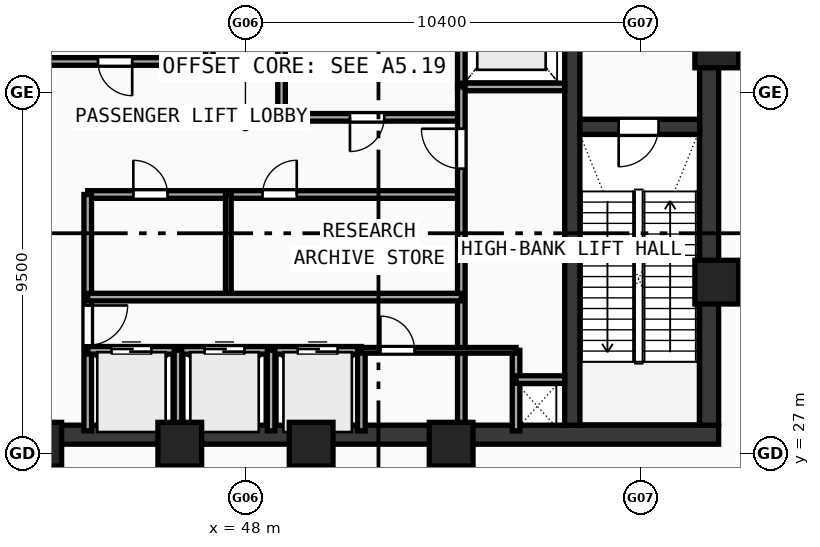
"""IFC4 building model, lengths in metres.
Left out: names, types, materials, properties, quantities, classifications, styles, units other than length and angle.
Written with IfcOpenShell. Run it as: python <this file> out.ifc"""

import sys

from ifc_helpers import new_model, si_unit, direction, frame, frame_2d, origin, origin_with_axes, origin_2d, place, context, subcontext, project, spatial, rectangle, hollow_rectangle, extrude, source, transform, mapped, element, fill, save


model = new_model("IFC4")
c1 = context("Model", 3, precision=1e-05, world=origin(), true_north=direction((0.0, 1.0)))
c2 = subcontext(c1, "Body", "Model", "MODEL_VIEW")
j1 = project(units=[si_unit("LENGTHUNIT", "METRE"), si_unit("PLANEANGLEUNIT", "RADIAN")], contexts=[c1])
p1 = place(None, origin())
s1 = spatial("IfcSite", under=j1, at=p1, CompositionType="ELEMENT")
p2 = place(p1, origin())
s2 = spatial("IfcBuilding", under=s1, at=p2, CompositionType="ELEMENT")
p3 = place(p2, frame((0.0, 0.0, 314.86)))
s3 = spatial("IfcBuildingStorey", under=s2, at=p3, CompositionType="ELEMENT", Elevation=314.86)
p4 = place(p3, frame((35.55, 27.5, 0.0), z_axis=(0.0, 0.0, 1.0), x_axis=(1.0, 0.0, 0.0)))
e1 = element("IfcWall", 1, at=p4, inside=s3, PredefinedType="SHEAR", context=c2, shape_type="SweptSolid", body=[
    extrude(rectangle(XDim=24.9, YDim=0.5, at=frame_2d((12.45, 0.0))), origin(), (0.0, 0.0, 1.0), 5.57),
])
p5 = place(p3, frame((60.2, 27.75, 0.0), z_axis=(0.0, 0.0, 1.0), x_axis=(0.0, 1.0, 0.0)))
e2 = element("IfcWall", 2, at=p5, inside=s3, PredefinedType="SHEAR", context=c2, shape_type="SweptSolid", body=[
    extrude(rectangle(XDim=12.2, YDim=0.5, at=frame_2d((6.1, 0.0))), origin(), (0.0, 0.0, 1.0), 5.57),
])
p6 = place(p3, frame((56.6, 27.75, 0.0), z_axis=(0.0, 0.0, 1.0), x_axis=(0.0, 1.0, 0.0)))
e3 = element("IfcWall", 3, at=p6, inside=s3, PredefinedType="SHEAR", context=c2, shape_type="SweptSolid", body=[
    extrude(rectangle(XDim=12.2, YDim=0.4, at=frame_2d((6.1, 0.0))), origin(), (0.0, 0.0, 1.0), 5.57),
])
p7 = place(p6, frame((10.0, 0.0, 0.0)))
e4 = element("IfcOpeningElement", 4, at=p7, cuts=e3, PredefinedType="OPENING", context=c2, shape_type="SweptSolid", body=[
    extrude(rectangle(XDim=1.1, YDim=2.1, at=frame_2d((0.55, 1.05))), frame((0.0, 0.21, 0.0), z_axis=(0.0, -1.0, 0.0), x_axis=(1.0, 0.0, 0.0)), (0.0, 0.0, 1.0), 0.42),
])
p8 = place(p3, frame((56.8, 35.6, 0.0), z_axis=(0.0, 0.0, 1.0), x_axis=(1.0, 0.0, 0.0)))
e5 = element("IfcWall", 5, at=p8, inside=s3, PredefinedType="SHEAR", context=c2, shape_type="SweptSolid", body=[
    extrude(rectangle(XDim=3.15, YDim=0.4, at=frame_2d((1.575, 0.0))), origin(), (0.0, 0.0, 1.0), 5.57),
])
p9 = place(p8, frame((1.02, 0.0, 0.0)))
e6 = element("IfcOpeningElement", 6, at=p9, cuts=e5, PredefinedType="OPENING", context=c2, shape_type="SweptSolid", body=[
    extrude(rectangle(XDim=1.05, YDim=2.1, at=frame_2d((0.525, 1.05))), frame((0.0, 0.21, 0.0), z_axis=(0.0, -1.0, 0.0), x_axis=(1.0, 0.0, 0.0)), (0.0, 0.0, 1.0), 0.42),
])
m1 = source(origin(), c2, "Body", "SweptSolid", [
    extrude(hollow_rectangle(XDim=1.15, YDim=1.15, WallThickness=0.048, at=origin_2d()), origin(), (0.0, 0.0, 1.0), 5.83),
])
for number, where, z_axis, x_axis in (
    (7, (42.588, 27.25, -0.26), (0.0, 0.0, 1.0), (1.0, 0.0, 0.0)),
    (8, (46.272, 27.25, -0.26), (0.0, 0.0, 1.0), (1.0, 0.0, 0.0)),
    (9, (49.729, 27.25, -0.26), (0.0, 0.0, 1.0), (1.0, 0.0, 0.0)),
    (10, (53.412, 27.25, -0.26), (0.0, 0.0, 1.0), (1.0, 0.0, 0.0)),
    (11, (60.4, 31.513, -0.26), (0.0, 0.0, 1.0), (1.0, 0.0, 0.0)),
    (12, (60.4, 37.729, -0.26), (0.0, 0.0, 1.0), (1.0, 0.0, 0.0)),
):
    element("IfcColumn", number, at=place(p3, frame(where, z_axis=z_axis, x_axis=x_axis)), inside=s3, PredefinedType="COLUMN", context=c2, shape_type="MappedRepresentation", body=[
        mapped(m1, transform((0.0, 0.0, 0.0), scale=1.0)),
    ])
p10 = place(p3, frame((53.68, 36.65, 0.0), z_axis=(0.0, 0.0, 1.0), x_axis=(0.0, 1.0, 0.0)))
e13 = element("IfcWall", 13, at=p10, inside=s3, PredefinedType="SOLIDWALL", context=c2, shape_type="SweptSolid", body=[
    extrude(rectangle(XDim=3.3, YDim=0.2, at=frame_2d((1.65, 0.0))), origin(), (0.0, 0.0, 1.0), 5.57),
])
p11 = place(p3, frame((53.68, 36.65, 0.0), z_axis=(0.0, 0.0, 1.0), x_axis=(1.0, 0.0, 0.0)))
e14 = element("IfcWall", 14, at=p11, inside=s3, PredefinedType="SOLIDWALL", context=c2, shape_type="SweptSolid", body=[
    extrude(rectangle(XDim=2.72, YDim=0.2, at=frame_2d((1.36, 0.0))), origin(), (0.0, 0.0, 1.0), 5.57),
])
p12 = place(p3, frame((42.32, 37.32, 0.0), z_axis=(0.0, 0.0, 1.0), x_axis=(1.0, 0.0, 0.0)))
e15 = element("IfcWall", 15, at=p12, inside=s3, PredefinedType="SOLIDWALL", context=c2, shape_type="SweptSolid", body=[
    extrude(rectangle(XDim=4.73, YDim=0.2, at=frame_2d((2.365, 0.0))), origin(), (0.0, 0.0, 1.0), 5.57),
])
p13 = place(p12, frame((1.8, 0.0, 0.0)))
e16 = element("IfcOpeningElement", 16, at=p13, cuts=e15, PredefinedType="OPENING", context=c2, shape_type="SweptSolid", body=[
    extrude(rectangle(XDim=0.9, YDim=2.1, at=frame_2d((0.45, 1.05))), frame((0.0, 0.11, 0.0), z_axis=(0.0, -1.0, 0.0), x_axis=(1.0, 0.0, 0.0)), (0.0, 0.0, 1.0), 0.22),
])
p14 = place(p3, frame((48.95, 35.85, 0.0), z_axis=(0.0, 0.0, 1.0), x_axis=(1.0, 0.0, 0.0)))
e17 = element("IfcWall", 17, at=p14, inside=s3, PredefinedType="SOLIDWALL", context=c2, shape_type="SweptSolid", body=[
    extrude(rectangle(XDim=4.73, YDim=0.2, at=frame_2d((2.365, 0.0))), origin(), (0.0, 0.0, 1.0), 5.57),
])
p15 = place(p14, frame((1.8, 0.0, 0.0)))
e18 = element("IfcOpeningElement", 18, at=p15, cuts=e17, PredefinedType="OPENING", context=c2, shape_type="SweptSolid", body=[
    extrude(rectangle(XDim=0.9, YDim=2.1, at=frame_2d((0.45, 1.05))), frame((0.0, 0.11, 0.0), z_axis=(0.0, -1.0, 0.0), x_axis=(1.0, 0.0, 0.0)), (0.0, 0.0, 1.0), 0.22),
])
p16 = place(p3, frame((47.05, 37.32, 0.0), z_axis=(0.0, 0.0, 1.0), x_axis=(0.0, 1.0, 0.0)))
e19 = element("IfcWall", 19, at=p16, inside=s3, PredefinedType="SOLIDWALL", context=c2, shape_type="SweptSolid", body=[
    extrude(rectangle(XDim=2.63, YDim=0.2, at=frame_2d((1.315, 0.0))), origin(), (0.0, 0.0, 1.0), 5.57),
])
p17 = place(p3, frame((48.95, 35.85, 0.0), z_axis=(0.0, 0.0, 1.0), x_axis=(0.0, 1.0, 0.0)))
e20 = element("IfcWall", 20, at=p17, inside=s3, PredefinedType="SOLIDWALL", context=c2, shape_type="SweptSolid", body=[
    extrude(rectangle(XDim=4.1, YDim=0.2, at=frame_2d((2.05, 0.0))), origin(), (0.0, 0.0, 1.0), 5.57),
])
p18 = place(p3, frame((43.85, 33.82, 0.0), z_axis=(0.0, 0.0, 1.0), x_axis=(1.0, 0.0, 0.0)))
e21 = element("IfcWall", 21, at=p18, inside=s3, PredefinedType="SOLIDWALL", context=c2, shape_type="SweptSolid", body=[
    extrude(rectangle(XDim=9.83, YDim=0.2, at=frame_2d((4.915, 0.0))), origin(), (0.0, 0.0, 1.0), 5.57),
])
p19 = place(p18, frame((1.2, 0.0, 0.0)))
e22 = element("IfcOpeningElement", 22, at=p19, cuts=e21, PredefinedType="OPENING", context=c2, shape_type="SweptSolid", body=[
    extrude(rectangle(XDim=0.9, YDim=2.1, at=frame_2d((0.45, 1.05))), frame((0.0, 0.11, 0.0), z_axis=(0.0, -1.0, 0.0), x_axis=(1.0, 0.0, 0.0)), (0.0, 0.0, 1.0), 0.22),
])
p20 = place(p18, frame((4.6, 0.0, 0.0)))
e23 = element("IfcOpeningElement", 23, at=p20, cuts=e21, PredefinedType="OPENING", context=c2, shape_type="SweptSolid", body=[
    extrude(rectangle(XDim=0.9, YDim=2.1, at=frame_2d((0.45, 1.05))), frame((0.0, 0.11, 0.0), z_axis=(0.0, -1.0, 0.0), x_axis=(1.0, 0.0, 0.0)), (0.0, 0.0, 1.0), 0.22),
])
p21 = place(p3, frame((43.85, 27.6, 0.0), z_axis=(0.0, 0.0, 1.0), x_axis=(0.0, 1.0, 0.0)))
e24 = element("IfcWall", 24, at=p21, inside=s3, PredefinedType="SOLIDWALL", context=c2, shape_type="SweptSolid", body=[
    extrude(rectangle(XDim=6.22, YDim=0.2, at=frame_2d((3.11, 0.0))), origin(), (0.0, 0.0, 1.0), 5.57),
])
p22 = place(p21, frame((2.25, 0.0, 0.0)))
e25 = element("IfcOpeningElement", 25, at=p22, cuts=e24, PredefinedType="OPENING", context=c2, shape_type="SweptSolid", body=[
    extrude(rectangle(XDim=1.05, YDim=2.1, at=frame_2d((0.525, 1.05))), frame((0.0, 0.11, 0.0), z_axis=(0.0, -1.0, 0.0), x_axis=(1.0, 0.0, 0.0)), (0.0, 0.0, 1.0), 0.22),
])
p23 = place(p3, frame((53.68, 27.6, 0.0), z_axis=(0.0, 0.0, 1.0), x_axis=(0.0, 1.0, 0.0)))
e26 = element("IfcWall", 26, at=p23, inside=s3, PredefinedType="SOLIDWALL", context=c2, shape_type="SweptSolid", body=[
    extrude(rectangle(XDim=9.05, YDim=0.2, at=frame_2d((4.525, 0.0))), origin(), (0.0, 0.0, 1.0), 2.22),
])
p24 = place(p23, frame((6.9, 0.0, 0.0)))
e27 = element("IfcOpeningElement", 27, at=p24, cuts=e26, PredefinedType="OPENING", context=c2, shape_type="SweptSolid", body=[
    extrude(rectangle(XDim=1.05, YDim=2.1, at=frame_2d((0.525, 1.05))), frame((0.0, 0.11, 0.0), z_axis=(0.0, -1.0, 0.0), x_axis=(1.0, 0.0, 0.0)), (0.0, 0.0, 1.0), 0.22),
])
p25 = place(p3, frame((47.55, 31.12, 0.0), z_axis=(0.0, 0.0, 1.0), x_axis=(0.0, 1.0, 0.0)))
e28 = element("IfcWall", 28, at=p25, inside=s3, PredefinedType="PARTITIONING", context=c2, shape_type="SweptSolid", body=[
    extrude(rectangle(XDim=2.7, YDim=0.15, at=frame_2d((1.35, 0.0))), origin(), (0.0, 0.0, 1.0), 5.57),
])
p26 = place(p3, frame((43.85, 29.72, 0.0), z_axis=(0.0, 0.0, 1.0), x_axis=(1.0, 0.0, 0.0)))
e29 = element("IfcWall", 29, at=p26, inside=s3, PredefinedType="SOLIDWALL", context=c2, shape_type="SweptSolid", body=[
    extrude(rectangle(XDim=7.2, YDim=0.2, at=frame_2d((3.6, 0.0))), origin(), (0.0, 0.0, 1.0), 5.57),
])
p27 = place(p26, frame((0.625, 0.0, 0.0)))
e30 = element("IfcOpeningElement", 30, at=p27, cuts=e29, PredefinedType="OPENING", context=c2, shape_type="SweptSolid", body=[
    extrude(rectangle(XDim=1.05, YDim=2.1, at=frame_2d((0.525, 1.05))), frame((0.0, 0.11, 0.0), z_axis=(0.0, -1.0, 0.0), x_axis=(1.0, 0.0, 0.0)), (0.0, 0.0, 1.0), 0.22),
])
p28 = place(p26, frame((3.075, 0.0, 0.0)))
e31 = element("IfcOpeningElement", 31, at=p28, cuts=e29, PredefinedType="OPENING", context=c2, shape_type="SweptSolid", body=[
    extrude(rectangle(XDim=1.05, YDim=2.1, at=frame_2d((0.525, 1.05))), frame((0.0, 0.11, 0.0), z_axis=(0.0, -1.0, 0.0), x_axis=(1.0, 0.0, 0.0)), (0.0, 0.0, 1.0), 0.22),
])
p29 = place(p26, frame((5.525, 0.0, 0.0)))
e32 = element("IfcOpeningElement", 32, at=p29, cuts=e29, PredefinedType="OPENING", context=c2, shape_type="SweptSolid", body=[
    extrude(rectangle(XDim=1.05, YDim=2.1, at=frame_2d((0.525, 1.05))), frame((0.0, 0.11, 0.0), z_axis=(0.0, -1.0, 0.0), x_axis=(1.0, 0.0, 0.0)), (0.0, 0.0, 1.0), 0.22),
])
p30 = place(p3, frame((51.05, 27.6, 0.0), z_axis=(0.0, 0.0, 1.0), x_axis=(0.0, 1.0, 0.0)))
e33 = element("IfcWall", 33, at=p30, inside=s3, PredefinedType="SOLIDWALL", context=c2, shape_type="SweptSolid", body=[
    extrude(rectangle(XDim=2.12, YDim=0.2, at=frame_2d((1.06, 0.0))), origin(), (0.0, 0.0, 1.0), 5.57),
])
p31 = place(p3, frame((43.85, 31.12, 0.0), z_axis=(0.0, 0.0, 1.0), x_axis=(1.0, 0.0, 0.0)))
e34 = element("IfcWall", 34, at=p31, inside=s3, PredefinedType="SOLIDWALL", context=c2, shape_type="SweptSolid", body=[
    extrude(rectangle(XDim=9.83, YDim=0.2, at=frame_2d((4.915, 0.0))), origin(), (0.0, 0.0, 1.0), 5.57),
])
p32 = place(p3, frame((46.225, 27.6, 0.0), z_axis=(0.0, 0.0, 1.0), x_axis=(0.0, 1.0, 0.0)))
e35 = element("IfcWall", 35, at=p32, inside=s3, PredefinedType="SOLIDWALL", context=c2, shape_type="SweptSolid", body=[
    extrude(rectangle(XDim=2.12, YDim=0.2, at=frame_2d((1.06, 0.0))), origin(), (0.0, 0.0, 1.0), 2.22),
])
for number, where, z_axis, x_axis in (
    (36, (48.675, 27.6, 0.0), (0.0, 0.0, 1.0), (0.0, 1.0, 0.0)),
    (37, (55.12, 27.6, 0.0), (0.0, 0.0, 1.0), (0.0, 1.0, 0.0)),
):
    element("IfcWall", number, at=place(p3, frame(where, z_axis=z_axis, x_axis=x_axis)), inside=s3, PredefinedType="SOLIDWALL", context=c2, shape_type="SweptSolid", body=[
        extrude(rectangle(XDim=2.12, YDim=0.2, at=frame_2d((1.06, 0.0))), origin(), (0.0, 0.0, 1.0), 5.57),
    ])
p33 = place(p3, frame((55.12, 28.95, 0.0), z_axis=(0.0, 0.0, 1.0), x_axis=(1.0, 0.0, 0.0)))
e38 = element("IfcWall", 38, at=p33, inside=s3, PredefinedType="SOLIDWALL", context=c2, shape_type="SweptSolid", body=[
    extrude(rectangle(XDim=1.28, YDim=0.2, at=frame_2d((0.64, 0.0))), origin(), (0.0, 0.0, 1.0), 5.57),
])
p34 = place(p3, frame((51.05, 29.72, 0.0), z_axis=(0.0, 0.0, 1.0), x_axis=(1.0, 0.0, 0.0)))
e39 = element("IfcWall", 39, at=p34, inside=s3, PredefinedType="PARTITIONING", context=c2, shape_type="SweptSolid", body=[
    extrude(rectangle(XDim=4.07, YDim=0.15, at=frame_2d((2.035, 0.0))), origin(), (0.0, 0.0, 1.0), 5.57),
])
p35 = place(p34, frame((0.5, 0.0, 0.0)))
e40 = element("IfcOpeningElement", 40, at=p35, cuts=e39, PredefinedType="OPENING", context=c2, shape_type="SweptSolid", body=[
    extrude(rectangle(XDim=0.9, YDim=2.1, at=frame_2d((0.45, 1.05))), frame((0.0, 0.085, 0.0), z_axis=(0.0, -1.0, 0.0), x_axis=(1.0, 0.0, 0.0)), (0.0, 0.0, 1.0), 0.17),
])
m2 = source(origin(), c2, "Body", "SweptSolid", [
    extrude(rectangle(XDim=1.05, YDim=2.1, at=frame_2d((0.525, 1.05))), frame((0.0, 0.025, 0.0), z_axis=(0.0, -1.0, 0.0), x_axis=(1.0, 0.0, 0.0)), (0.0, 0.0, 1.0), 0.05),
])
p36 = place(p9, frame((1.05, 0.0, 0.0), z_axis=(0.0, 0.0, 1.0), x_axis=(-1.0, 0.0, 0.0)))
e41 = element("IfcDoor", 41, at=p36, inside=s3, OperationType="SINGLE_SWING_RIGHT", PredefinedType="DOOR", context=c2, shape_type="MappedRepresentation", body=[
    mapped(m2, transform((0.0, 0.0, 0.0), scale=1.0)),
])
fill(e6, e41)
m3 = source(origin(), c2, "Body", "SweptSolid", [
    extrude(rectangle(XDim=0.9, YDim=2.1, at=frame_2d((0.45, 1.05))), frame((0.0, 0.025, 0.0), z_axis=(0.0, -1.0, 0.0), x_axis=(1.0, 0.0, 0.0)), (0.0, 0.0, 1.0), 0.05),
])
p37 = place(p13, frame((0.9, 0.0, 0.0), z_axis=(0.0, 0.0, 1.0), x_axis=(-1.0, 0.0, 0.0)))
e42 = element("IfcDoor", 42, at=p37, inside=s3, OperationType="SINGLE_SWING_LEFT", PredefinedType="DOOR", context=c2, shape_type="MappedRepresentation", body=[
    mapped(m3, transform((0.0, 0.0, 0.0), scale=1.0)),
])
fill(e16, e42)
p38 = place(p15, frame((0.9, 0.0, 0.0), z_axis=(0.0, 0.0, 1.0), x_axis=(-1.0, 0.0, 0.0)))
e43 = element("IfcDoor", 43, at=p38, inside=s3, OperationType="SINGLE_SWING_RIGHT", PredefinedType="DOOR", context=c2, shape_type="MappedRepresentation", body=[
    mapped(m3, transform((0.0, 0.0, 0.0), scale=1.0)),
])
fill(e18, e43)
p39 = place(p19, origin_with_axes())
e44 = element("IfcDoor", 44, at=p39, inside=s3, OperationType="SINGLE_SWING_LEFT", PredefinedType="DOOR", context=c2, shape_type="MappedRepresentation", body=[
    mapped(m3, transform((0.0, 0.0, 0.0), scale=1.0)),
])
fill(e22, e44)
p40 = place(p20, origin_with_axes())
e45 = element("IfcDoor", 45, at=p40, inside=s3, OperationType="SINGLE_SWING_RIGHT", PredefinedType="DOOR", context=c2, shape_type="MappedRepresentation", body=[
    mapped(m3, transform((0.0, 0.0, 0.0), scale=1.0)),
])
fill(e23, e45)
p41 = place(p22, frame((1.05, 0.0, 0.0), z_axis=(0.0, 0.0, 1.0), x_axis=(-1.0, 0.0, 0.0)))
e46 = element("IfcDoor", 46, at=p41, inside=s3, OperationType="SINGLE_SWING_LEFT", PredefinedType="DOOR", context=c2, shape_type="MappedRepresentation", body=[
    mapped(m2, transform((0.0, 0.0, 0.0), scale=1.0)),
])
fill(e25, e46)
p42 = place(p24, origin_with_axes())
e47 = element("IfcDoor", 47, at=p42, inside=s3, OperationType="SINGLE_SWING_RIGHT", PredefinedType="DOOR", context=c2, shape_type="MappedRepresentation", body=[
    mapped(m2, transform((0.0, 0.0, 0.0), scale=1.0)),
])
fill(e27, e47)
p43 = place(p27, origin_with_axes())
e48 = element("IfcDoor", 48, at=p43, inside=s3, OperationType="DOUBLE_DOOR_SLIDING", PredefinedType="DOOR", context=c2, shape_type="MappedRepresentation", body=[
    mapped(m2, transform((0.0, 0.0, 0.0), scale=1.0)),
])
fill(e30, e48)
p44 = place(p28, origin_with_axes())
e49 = element("IfcDoor", 49, at=p44, inside=s3, OperationType="DOUBLE_DOOR_SLIDING", PredefinedType="DOOR", context=c2, shape_type="MappedRepresentation", body=[
    mapped(m2, transform((0.0, 0.0, 0.0), scale=1.0)),
])
fill(e31, e49)
p45 = place(p29, origin_with_axes())
e50 = element("IfcDoor", 50, at=p45, inside=s3, OperationType="DOUBLE_DOOR_SLIDING", PredefinedType="DOOR", context=c2, shape_type="MappedRepresentation", body=[
    mapped(m2, transform((0.0, 0.0, 0.0), scale=1.0)),
])
fill(e32, e50)
p46 = place(p35, origin_with_axes())
e51 = element("IfcDoor", 51, at=p46, inside=s3, OperationType="SINGLE_SWING_LEFT", PredefinedType="DOOR", context=c2, shape_type="MappedRepresentation", body=[
    mapped(m3, transform((0.0, 0.0, 0.0), scale=1.0)),
])
fill(e40, e51)
save(model, sys.argv[1])
